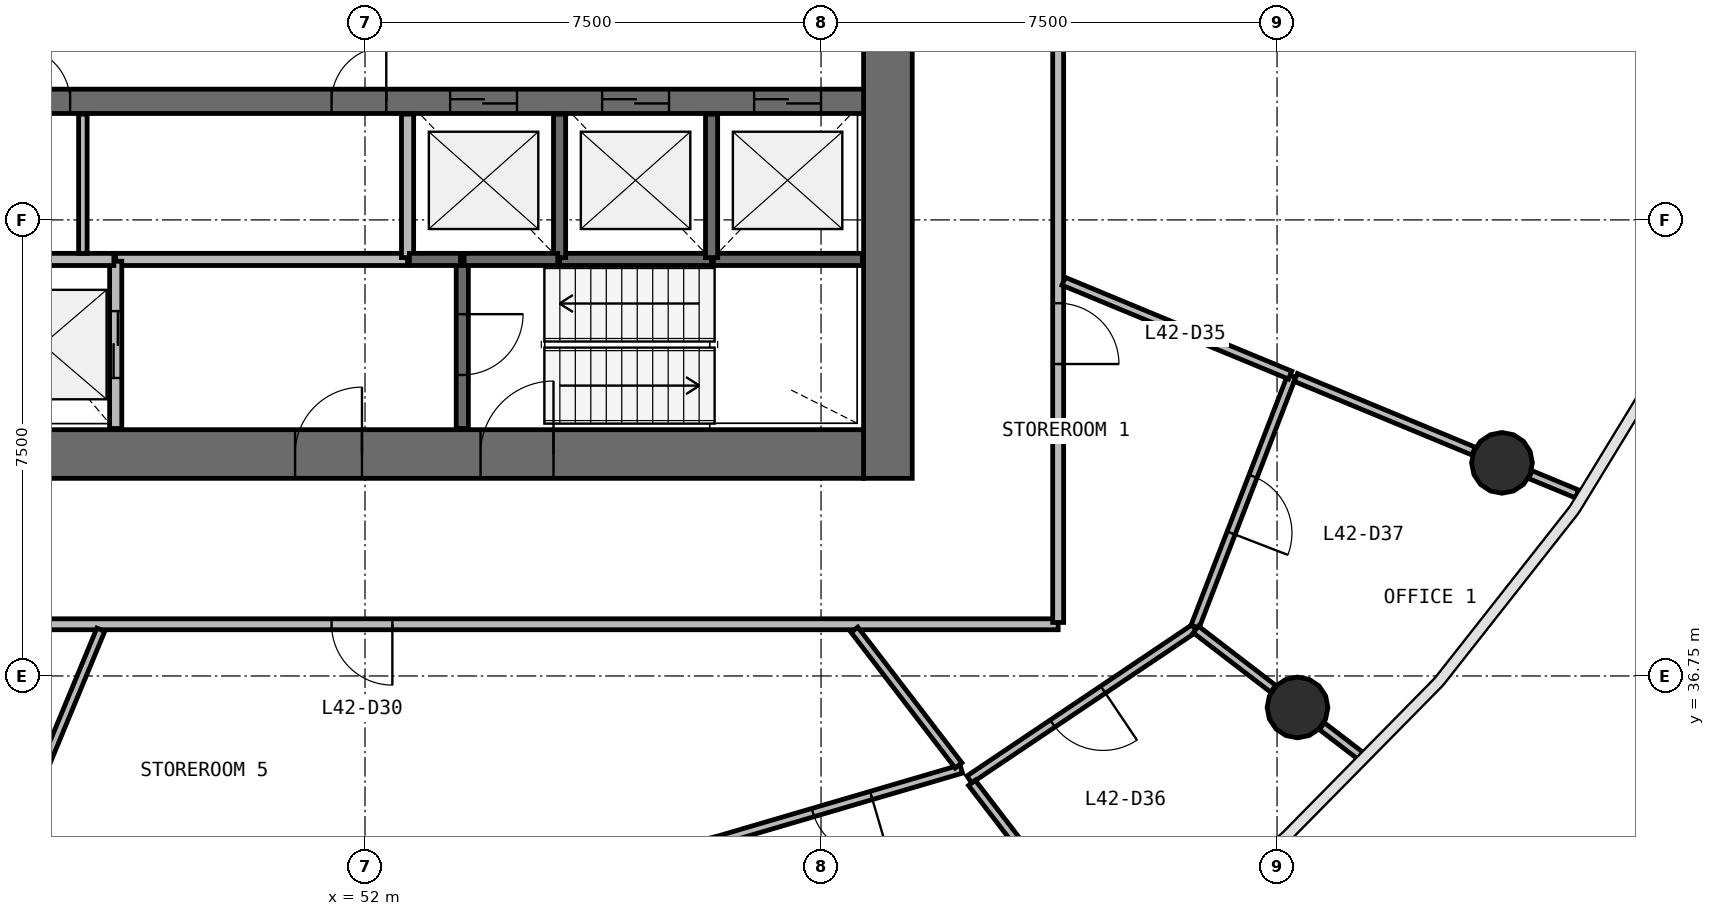
"""IFC4 building model, lengths in metres.
Left out: names, types, materials, properties, quantities, classifications, styles, units other than length and angle.
Written with IfcOpenShell. Run it as: python <this file> out.ifc"""

import sys

from ifc_helpers import new_model, si_unit, direction, frame, frame_2d, origin, origin_2d, place, context, subcontext, project, spatial, rectangle, circle, extrude, source, transform, mapped, element, fill, save


model = new_model("IFC4")
c1 = context("Model", 3, precision=1e-05, world=origin(), true_north=direction((0.0, 1.0)))
c2 = subcontext(c1, "Body", "Model", "MODEL_VIEW")
j1 = project(units=[si_unit("LENGTHUNIT", "METRE"), si_unit("PLANEANGLEUNIT", "RADIAN")], contexts=[c1])
p1 = place(None, origin())
s1 = spatial("IfcSite", under=j1, at=p1, CompositionType="ELEMENT")
p2 = place(p1, origin())
s2 = spatial("IfcBuilding", under=s1, at=p2, CompositionType="ELEMENT")
p3 = place(p2, frame((0.0, 0.0, 176.0)))
s3 = spatial("IfcBuildingStorey", under=s2, at=p3, CompositionType="ELEMENT", Elevation=176.0)
p4 = place(p3, frame((60.6, 40.0, 0.0), z_axis=(0.0, 0.0, 1.0), x_axis=(0.0, 1.0, 0.0)))
e1 = element("IfcWall", 1, at=p4, inside=s3, PredefinedType="SHEAR", context=c2, shape_type="SweptSolid", body=[
    extrude(rectangle(XDim=16.0, YDim=0.8, at=frame_2d((8.0, 0.0))), origin(), (0.0, 0.0, 1.0), 3.9),
])
p5 = place(p4, frame((7.1, 0.0, 0.0)))
e2 = element("IfcOpeningElement", 2, at=p5, cuts=e1, PredefinedType="OPENING", context=c2, shape_type="SweptSolid", body=[
    extrude(rectangle(XDim=1.8, YDim=2.1, at=frame_2d((0.9, 1.05))), frame((0.0, 0.41, 0.0), z_axis=(0.0, -1.0, 0.0), x_axis=(1.0, 0.0, 0.0)), (0.0, 0.0, 1.0), 0.82),
])
p6 = place(p3, frame((43.8, 40.4, 0.0), z_axis=(0.0, 0.0, 1.0), x_axis=(1.0, 0.0, 0.0)))
e3 = element("IfcWall", 3, at=p6, inside=s3, PredefinedType="SHEAR", context=c2, shape_type="SweptSolid", body=[
    extrude(rectangle(XDim=16.4, YDim=0.8, at=frame_2d((8.2, 0.0))), origin(), (0.0, 0.0, 1.0), 3.9),
])
p7 = place(p6, frame((10.1, 0.0, 0.0)))
e4 = element("IfcOpeningElement", 4, at=p7, cuts=e3, PredefinedType="OPENING", context=c2, shape_type="SweptSolid", body=[
    extrude(rectangle(XDim=1.2, YDim=2.1, at=frame_2d((0.6, 1.05))), frame((0.0, 0.41, 0.0), z_axis=(0.0, -1.0, 0.0), x_axis=(1.0, 0.0, 0.0)), (0.0, 0.0, 1.0), 0.82),
])
p8 = place(p6, frame((7.05, 0.0, 0.0)))
e5 = element("IfcOpeningElement", 5, at=p8, cuts=e3, PredefinedType="OPENING", context=c2, shape_type="SweptSolid", body=[
    extrude(rectangle(XDim=1.1, YDim=2.1, at=frame_2d((0.55, 1.05))), frame((0.0, 0.41, 0.0), z_axis=(0.0, -1.0, 0.0), x_axis=(1.0, 0.0, 0.0)), (0.0, 0.0, 1.0), 0.82),
])
p9 = place(p6, frame((0.5, 0.0, 0.0)))
e6 = element("IfcOpeningElement", 6, at=p9, cuts=e3, PredefinedType="OPENING", context=c2, shape_type="SweptSolid", body=[
    extrude(rectangle(XDim=0.8, YDim=2.1, at=frame_2d((0.4, 1.05))), frame((0.0, 0.41, 0.0), z_axis=(0.0, -1.0, 0.0), x_axis=(1.0, 0.0, 0.0)), (0.0, 0.0, 1.0), 0.82),
])
p10 = place(p3, frame((43.8, 46.2, 0.0), z_axis=(0.0, 0.0, 1.0), x_axis=(1.0, 0.0, 0.0)))
e7 = element("IfcWall", 7, at=p10, inside=s3, PredefinedType="SHEAR", context=c2, shape_type="SweptSolid", body=[
    extrude(rectangle(XDim=16.4, YDim=0.4, at=frame_2d((8.2, 0.0))), origin(), (0.0, 0.0, 1.0), 3.9),
])
p11 = place(p10, frame((9.6, 0.0, 0.0)))
e8 = element("IfcOpeningElement", 8, at=p11, cuts=e7, PredefinedType="OPENING", context=c2, shape_type="SweptSolid", body=[
    extrude(rectangle(XDim=1.1, YDim=2.1, at=frame_2d((0.55, 1.05))), frame((0.0, 0.21, 0.0), z_axis=(0.0, -1.0, 0.0), x_axis=(1.0, 0.0, 0.0)), (0.0, 0.0, 1.0), 0.42),
])
p12 = place(p10, frame((12.1, 0.0, 0.0)))
e9 = element("IfcOpeningElement", 9, at=p12, cuts=e7, PredefinedType="OPENING", context=c2, shape_type="SweptSolid", body=[
    extrude(rectangle(XDim=1.1, YDim=2.1, at=frame_2d((0.55, 1.05))), frame((0.0, 0.21, 0.0), z_axis=(0.0, -1.0, 0.0), x_axis=(1.0, 0.0, 0.0)), (0.0, 0.0, 1.0), 0.42),
])
p13 = place(p10, frame((14.6, 0.0, 0.0)))
e10 = element("IfcOpeningElement", 10, at=p13, cuts=e7, PredefinedType="OPENING", context=c2, shape_type="SweptSolid", body=[
    extrude(rectangle(XDim=1.1, YDim=2.1, at=frame_2d((0.55, 1.05))), frame((0.0, 0.21, 0.0), z_axis=(0.0, -1.0, 0.0), x_axis=(1.0, 0.0, 0.0)), (0.0, 0.0, 1.0), 0.42),
])
p14 = place(p10, frame((2.45, 0.0, 0.0)))
e11 = element("IfcOpeningElement", 11, at=p14, cuts=e7, PredefinedType="OPENING", context=c2, shape_type="SweptSolid", body=[
    extrude(rectangle(XDim=0.9, YDim=2.1, at=frame_2d((0.45, 1.05))), frame((0.0, 0.21, 0.0), z_axis=(0.0, -1.0, 0.0), x_axis=(1.0, 0.0, 0.0)), (0.0, 0.0, 1.0), 0.42),
])
p15 = place(p10, frame((7.65, 0.0, 0.0)))
e12 = element("IfcOpeningElement", 12, at=p15, cuts=e7, PredefinedType="OPENING", context=c2, shape_type="SweptSolid", body=[
    extrude(rectangle(XDim=0.9, YDim=2.1, at=frame_2d((0.45, 1.05))), frame((0.0, 0.21, 0.0), z_axis=(0.0, -1.0, 0.0), x_axis=(1.0, 0.0, 0.0)), (0.0, 0.0, 1.0), 0.42),
])
m1 = source(origin(), c2, "Body", "SweptSolid", [
    extrude(circle(Radius=0.5, at=origin_2d()), origin(), (0.0, 0.0, 1.0), 3.9),
])
for number, where, z_axis, x_axis in (
    (13, (67.336, 36.232, 0.0), (0.0, 0.0, 1.0), (1.0, 0.0, 0.0)),
    (14, (70.699, 40.254, 0.0), (0.0, 0.0, 1.0), (1.0, 0.0, 0.0)),
):
    element("IfcColumn", number, at=place(p3, frame(where, z_axis=z_axis, x_axis=x_axis)), inside=s3, PredefinedType="COLUMN", context=c2, shape_type="MappedRepresentation", body=[
        mapped(m1, transform((0.0, 0.0, 0.0), scale=1.0)),
    ])
p16 = place(p3, frame((52.7, 43.6, 0.0), z_axis=(0.0, 0.0, 1.0), x_axis=(-1.0, 0.0, 0.0)))
e15 = element("IfcWall", 15, at=p16, inside=s3, PredefinedType="SOLIDWALL", context=c2, shape_type="SweptSolid", body=[
    extrude(rectangle(XDim=4.8, YDim=0.2, at=frame_2d((2.4, 0.0))), origin(), (0.0, 0.0, 1.0), 3.4),
])
p17 = place(p3, frame((47.9, 40.82, 0.0), z_axis=(0.0, 0.0, 1.0), x_axis=(0.0, 1.0, 0.0)))
e16 = element("IfcWall", 16, at=p17, inside=s3, PredefinedType="SOLIDWALL", context=c2, shape_type="SweptSolid", body=[
    extrude(rectangle(XDim=2.75, YDim=0.2, at=frame_2d((1.375, 0.0))), origin(), (0.0, 0.0, 1.0), 3.4),
])
p18 = place(p17, frame((0.83, 0.0, 0.0)))
e17 = element("IfcOpeningElement", 17, at=p18, cuts=e16, PredefinedType="OPENING", context=c2, shape_type="SweptSolid", body=[
    extrude(rectangle(XDim=1.1, YDim=2.1, at=frame_2d((0.55, 1.05))), frame((0.0, 0.11, 0.0), z_axis=(0.0, -1.0, 0.0), x_axis=(1.0, 0.0, 0.0)), (0.0, 0.0, 1.0), 0.22),
])
p19 = place(p3, frame((53.6, 43.6, 0.0), z_axis=(0.0, 0.0, 1.0), x_axis=(0.0, -1.0, 0.0)))
e18 = element("IfcWall", 18, at=p19, inside=s3, PredefinedType="SOLIDWALL", context=c2, shape_type="SweptSolid", body=[
    extrude(rectangle(XDim=2.78, YDim=0.2, at=frame_2d((1.39, 0.0))), origin(), (0.0, 0.0, 1.0), 3.4),
])
p20 = place(p19, frame((0.9, 0.0, 0.0)))
e19 = element("IfcOpeningElement", 19, at=p20, cuts=e18, PredefinedType="OPENING", context=c2, shape_type="SweptSolid", body=[
    extrude(rectangle(XDim=1.0, YDim=2.1, at=frame_2d((0.5, 1.05))), frame((0.0, 0.11, 0.0), z_axis=(0.0, -1.0, 0.0), x_axis=(1.0, 0.0, 0.0)), (0.0, 0.0, 1.0), 0.22),
])
p21 = place(p3, frame((55.2, 43.6, 0.0), z_axis=(0.0, 0.0, 1.0), x_axis=(1.0, 0.0, 0.0)))
e20 = element("IfcWall", 20, at=p21, inside=s3, PredefinedType="SOLIDWALL", context=c2, shape_type="SweptSolid", body=[
    extrude(rectangle(XDim=2.5, YDim=0.2, at=frame_2d((1.25, 0.0))), origin(), (0.0, 0.0, 1.0), 3.4),
])
p22 = place(p3, frame((57.73, 43.6, 0.0), z_axis=(0.0, 0.0, 1.0), x_axis=(1.0, 0.0, 0.0)))
e21 = element("IfcWall", 21, at=p22, inside=s3, PredefinedType="SOLIDWALL", context=c2, shape_type="SweptSolid", body=[
    extrude(rectangle(XDim=2.45, YDim=0.2, at=frame_2d((1.225, 0.0))), origin(), (0.0, 0.0, 1.0), 3.4),
])
p23 = place(p3, frame((47.87, 43.6, 0.0), z_axis=(0.0, 0.0, 1.0), x_axis=(-1.0, 0.0, 0.0)))
e22 = element("IfcWall", 22, at=p23, inside=s3, PredefinedType="SOLIDWALL", context=c2, shape_type="SweptSolid", body=[
    extrude(rectangle(XDim=2.34, YDim=0.2, at=frame_2d((1.17, 0.0))), origin(), (0.0, 0.0, 1.0), 3.4),
])
for number, where, z_axis, x_axis in (
    (23, (52.7, 45.99, 0.0), (0.0, 0.0, 1.0), (0.0, -1.0, 0.0)),
    (24, (55.2, 43.63, 0.0), (0.0, 0.0, 1.0), (0.0, 1.0, 0.0)),
    (25, (57.7, 43.63, 0.0), (0.0, 0.0, 1.0), (0.0, 1.0, 0.0)),
):
    element("IfcWall", number, at=place(p3, frame(where, z_axis=z_axis, x_axis=x_axis)), inside=s3, PredefinedType="SOLIDWALL", context=c2, shape_type="SweptSolid", body=[
        extrude(rectangle(XDim=2.36, YDim=0.2, at=frame_2d((1.18, 0.0))), origin(), (0.0, 0.0, 1.0), 3.4),
    ])
p24 = place(p3, frame((53.63, 43.6, 0.0), z_axis=(0.0, 0.0, 1.0), x_axis=(1.0, 0.0, 0.0)))
e26 = element("IfcWall", 26, at=p24, inside=s3, PredefinedType="SOLIDWALL", context=c2, shape_type="SweptSolid", body=[
    extrude(rectangle(XDim=1.54, YDim=0.2, at=frame_2d((0.77, 0.0))), origin(), (0.0, 0.0, 1.0), 3.4),
])
p25 = place(p3, frame((52.73, 43.6, 0.0), z_axis=(0.0, 0.0, 1.0), x_axis=(1.0, 0.0, 0.0)))
e27 = element("IfcWall", 27, at=p25, inside=s3, PredefinedType="SOLIDWALL", context=c2, shape_type="SweptSolid", body=[
    extrude(rectangle(XDim=0.84, YDim=0.2, at=frame_2d((0.42, 0.0))), origin(), (0.0, 0.0, 1.0), 3.4),
])
p26 = place(p3, frame((63.4, 37.6, 0.0), z_axis=(0.0, 0.0, 1.0), x_axis=(-1.0, 0.0, 0.0)))
e28 = element("IfcWall", 28, at=p26, inside=s3, PredefinedType="PARTITIONING", context=c2, shape_type="SweptSolid", body=[
    extrude(rectangle(XDim=22.8, YDim=0.18, at=frame_2d((11.4, 0.0))), origin(), (0.0, 0.0, 1.0), 2.7),
])
p27 = place(p26, frame((10.95, 0.0, 0.0)))
e29 = element("IfcOpeningElement", 29, at=p27, cuts=e28, PredefinedType="OPENING", context=c2, shape_type="SweptSolid", body=[
    extrude(rectangle(XDim=1.0, YDim=2.1, at=frame_2d((0.5, 1.05))), frame((0.0, 0.1, 0.0), z_axis=(0.0, -1.0, 0.0), x_axis=(1.0, 0.0, 0.0)), (0.0, 0.0, 1.0), 0.2),
])
p28 = place(p3, frame((63.4, 58.37, 0.0), z_axis=(0.0, 0.0, 1.0), x_axis=(0.0, -1.0, 0.0)))
e30 = element("IfcWall", 30, at=p28, inside=s3, PredefinedType="PARTITIONING", context=c2, shape_type="SweptSolid", body=[
    extrude(rectangle(XDim=20.74, YDim=0.18, at=frame_2d((10.37, 0.0))), origin(), (0.0, 0.0, 1.0), 2.7),
])
p29 = place(p28, frame((15.49, 0.0, 0.0)))
e31 = element("IfcOpeningElement", 31, at=p29, cuts=e30, PredefinedType="OPENING", context=c2, shape_type="SweptSolid", body=[
    extrude(rectangle(XDim=1.0, YDim=2.1, at=frame_2d((0.5, 1.05))), frame((0.0, 0.1, 0.0), z_axis=(0.0, -1.0, 0.0), x_axis=(1.0, 0.0, 0.0)), (0.0, 0.0, 1.0), 0.2),
])
p30 = place(p28, frame((9.89, 0.0, 0.0)))
e32 = element("IfcOpeningElement", 32, at=p30, cuts=e30, PredefinedType="OPENING", context=c2, shape_type="SweptSolid", body=[
    extrude(rectangle(XDim=1.0, YDim=2.1, at=frame_2d((0.5, 1.05))), frame((0.0, 0.1, 0.0), z_axis=(0.0, -1.0, 0.0), x_axis=(1.0, 0.0, 0.0)), (0.0, 0.0, 1.0), 0.2),
])
p31 = place(p3, frame((47.655, 37.51, 0.0), z_axis=(0.0, 0.0, 1.0), x_axis=(-0.382665709235, -0.923886873473, 0.0)))
e33 = element("IfcWall", 33, at=p31, inside=s3, PredefinedType="PARTITIONING", context=c2, shape_type="SweptSolid", body=[
    extrude(rectangle(XDim=5.266, YDim=0.14, at=frame_2d((2.633, 0.0))), origin(), (0.0, 0.0, 1.0), 2.7),
])
p32 = place(p3, frame((65.64, 37.534, 0.0), z_axis=(0.0, 0.0, 1.0), x_axis=(-0.83011613123, -0.557590538543, 0.0)))
e34 = element("IfcWall", 34, at=p32, inside=s3, PredefinedType="PARTITIONING", context=c2, shape_type="SweptSolid", body=[
    extrude(rectangle(XDim=4.459, YDim=0.14, at=frame_2d((2.229, 0.0))), origin(), (0.0, 0.0, 1.0), 2.7),
])
p33 = place(p32, frame((1.809, 0.0, 0.0)))
e35 = element("IfcOpeningElement", 35, at=p33, cuts=e34, PredefinedType="OPENING", context=c2, shape_type="SweptSolid", body=[
    extrude(rectangle(XDim=1.0, YDim=2.1, at=frame_2d((0.5, 1.05))), frame((0.0, 0.08, 0.0), z_axis=(0.0, -1.0, 0.0), x_axis=(1.0, 0.0, 0.0)), (0.0, 0.0, 1.0), 0.16),
])
p34 = place(p3, frame((67.243, 41.686, 0.0), z_axis=(0.0, 0.0, 1.0), x_axis=(-0.36010004646, -0.932913691903, 0.0)))
e36 = element("IfcWall", 36, at=p34, inside=s3, PredefinedType="PARTITIONING", context=c2, shape_type="SweptSolid", body=[
    extrude(rectangle(XDim=4.421, YDim=0.14, at=frame_2d((2.21, 0.0))), origin(), (0.0, 0.0, 1.0), 2.7),
])
p35 = place(p34, frame((1.771, 0.0, 0.0)))
e37 = element("IfcOpeningElement", 37, at=p35, cuts=e36, PredefinedType="OPENING", context=c2, shape_type="SweptSolid", body=[
    extrude(rectangle(XDim=1.0, YDim=2.1, at=frame_2d((0.5, 1.05))), frame((0.0, 0.08, 0.0), z_axis=(0.0, -1.0, 0.0), x_axis=(1.0, 0.0, 0.0)), (0.0, 0.0, 1.0), 0.16),
])
p36 = place(p3, frame((61.807, 35.219, 0.0), z_axis=(0.0, 0.0, 1.0), x_axis=(-0.959548852108, -0.281542182308, 0.0)))
e38 = element("IfcWall", 38, at=p36, inside=s3, PredefinedType="PARTITIONING", context=c2, shape_type="SweptSolid", body=[
    extrude(rectangle(XDim=4.194, YDim=0.14, at=frame_2d((2.097, 0.0))), origin(), (0.0, 0.0, 1.0), 2.7),
])
p37 = place(p36, frame((1.544, 0.0, 0.0)))
e39 = element("IfcOpeningElement", 39, at=p37, cuts=e38, PredefinedType="OPENING", context=c2, shape_type="SweptSolid", body=[
    extrude(rectangle(XDim=1.0, YDim=2.1, at=frame_2d((0.5, 1.05))), frame((0.0, 0.08, 0.0), z_axis=(0.0, -1.0, 0.0), x_axis=(1.0, 0.0, 0.0)), (0.0, 0.0, 1.0), 0.16),
])
p38 = place(p3, frame((63.49, 43.241, 0.0), z_axis=(0.0, 0.0, 1.0), x_axis=(0.923881042502, -0.382679786906, 0.0)))
e40 = element("IfcWall", 40, at=p38, inside=s3, PredefinedType="PARTITIONING", context=c2, shape_type="SweptSolid", body=[
    extrude(rectangle(XDim=4.032, YDim=0.14, at=frame_2d((2.016, 0.0))), origin(), (0.0, 0.0, 1.0), 2.7),
])
p39 = place(p3, frame((67.307, 41.659, 0.0), z_axis=(0.0, 0.0, 1.0), x_axis=(0.923882446808, -0.382676396554, 0.0)))
e41 = element("IfcWall", 41, at=p39, inside=s3, PredefinedType="PARTITIONING", context=c2, shape_type="SweptSolid", body=[
    extrude(rectangle(XDim=3.166, YDim=0.14, at=frame_2d((1.583, 0.0))), origin(), (0.0, 0.0, 1.0), 2.7),
])
p40 = place(p3, frame((60.049, 37.51, 0.0), z_axis=(0.0, 0.0, 1.0), x_axis=(0.608728570765, -0.793378552228, 0.0)))
e42 = element("IfcWall", 42, at=p40, inside=s3, PredefinedType="PARTITIONING", context=c2, shape_type="SweptSolid", body=[
    extrude(rectangle(XDim=2.812, YDim=0.14, at=frame_2d((1.406, 0.0))), origin(), (0.0, 0.0, 1.0), 2.7),
])
p41 = place(p3, frame((47.36, 43.7, 0.0), z_axis=(0.0, 0.0, 1.0), x_axis=(0.0, 1.0, 0.0)))
e43 = element("IfcWall", 43, at=p41, inside=s3, PredefinedType="PARTITIONING", context=c2, shape_type="SweptSolid", body=[
    extrude(rectangle(XDim=2.29, YDim=0.14, at=frame_2d((1.145, 0.0))), origin(), (0.0, 0.0, 1.0), 2.7),
])
p42 = place(p3, frame((61.981, 34.992, 0.0), z_axis=(0.0, 0.0, 1.0), x_axis=(0.608771999469, -0.79334522918, 0.0)))
e44 = element("IfcWall", 44, at=p42, inside=s3, PredefinedType="PARTITIONING", context=c2, shape_type="SweptSolid", body=[
    extrude(rectangle(XDim=2.062, YDim=0.14, at=frame_2d((1.031, 0.0))), origin(), (0.0, 0.0, 1.0), 2.7),
])
p43 = place(p3, frame((65.664, 37.515, 0.0), z_axis=(0.0, 0.0, 1.0), x_axis=(0.793319585816, -0.608805416173, 0.0)))
e45 = element("IfcWall", 45, at=p43, inside=s3, PredefinedType="PARTITIONING", context=c2, shape_type="SweptSolid", body=[
    extrude(rectangle(XDim=1.604, YDim=0.14, at=frame_2d((0.802, 0.0))), origin(), (0.0, 0.0, 1.0), 2.7),
])
p44 = place(p3, frame((71.166, 40.061, 0.0), z_axis=(0.0, 0.0, 1.0), x_axis=(0.923909393783, -0.382611332921, 0.0)))
e46 = element("IfcWall", 46, at=p44, inside=s3, PredefinedType="PARTITIONING", context=c2, shape_type="SweptSolid", body=[
    extrude(rectangle(XDim=0.831, YDim=0.14, at=frame_2d((0.416, 0.0))), origin(), (0.0, 0.0, 1.0), 2.7),
])
p45 = place(p3, frame((67.737, 35.925, 0.0), z_axis=(0.0, 0.0, 1.0), x_axis=(0.793425360376, -0.608667559109, 0.0)))
e47 = element("IfcWall", 47, at=p45, inside=s3, PredefinedType="PARTITIONING", context=c2, shape_type="SweptSolid", body=[
    extrude(rectangle(XDim=0.803, YDim=0.14, at=frame_2d((0.402, 0.0))), origin(), (0.0, 0.0, 1.0), 2.7),
])
m2 = source(origin(), c2, "Body", "SweptSolid", [
    extrude(rectangle(XDim=1.1, YDim=2.1, at=frame_2d((0.55, 1.05))), frame((0.0, 0.025, 0.0), z_axis=(0.0, -1.0, 0.0), x_axis=(1.0, 0.0, 0.0)), (0.0, 0.0, 1.0), 0.05),
])
p46 = place(p11, origin())
e48 = element("IfcDoor", 48, at=p46, inside=s3, OperationType="DOUBLE_DOOR_SLIDING", PredefinedType="USERDEFINED", context=c2, shape_type="MappedRepresentation", body=[
    mapped(m2, transform((0.0, 0.0, 0.0), scale=1.0)),
])
fill(e8, e48)
p47 = place(p12, origin())
e49 = element("IfcDoor", 49, at=p47, inside=s3, OperationType="DOUBLE_DOOR_SLIDING", PredefinedType="USERDEFINED", context=c2, shape_type="MappedRepresentation", body=[
    mapped(m2, transform((0.0, 0.0, 0.0), scale=1.0)),
])
fill(e9, e49)
p48 = place(p13, origin())
e50 = element("IfcDoor", 50, at=p48, inside=s3, OperationType="DOUBLE_DOOR_SLIDING", PredefinedType="USERDEFINED", context=c2, shape_type="MappedRepresentation", body=[
    mapped(m2, transform((0.0, 0.0, 0.0), scale=1.0)),
])
fill(e10, e50)
p49 = place(p18, origin())
e51 = element("IfcDoor", 51, at=p49, inside=s3, OperationType="DOUBLE_DOOR_SLIDING", PredefinedType="USERDEFINED", context=c2, shape_type="MappedRepresentation", body=[
    mapped(m2, transform((0.0, 0.0, 0.0), scale=1.0)),
])
fill(e17, e51)
m3 = source(origin(), c2, "Body", "SweptSolid", [
    extrude(rectangle(XDim=1.2, YDim=2.1, at=frame_2d((0.6, 1.05))), frame((0.0, 0.025, 0.0), z_axis=(0.0, -1.0, 0.0), x_axis=(1.0, 0.0, 0.0)), (0.0, 0.0, 1.0), 0.05),
])
p50 = place(p7, origin())
e52 = element("IfcDoor", 52, at=p50, inside=s3, OperationType="SINGLE_SWING_RIGHT", PredefinedType="DOOR", context=c2, shape_type="MappedRepresentation", body=[
    mapped(m3, transform((0.0, 0.0, 0.0), scale=1.0)),
])
fill(e4, e52)
m4 = source(origin(), c2, "Body", "SweptSolid", [
    extrude(rectangle(XDim=1.0, YDim=2.1, at=frame_2d((0.5, 1.05))), frame((0.0, 0.025, 0.0), z_axis=(0.0, -1.0, 0.0), x_axis=(1.0, 0.0, 0.0)), (0.0, 0.0, 1.0), 0.05),
])
p51 = place(p20, origin())
e53 = element("IfcDoor", 53, at=p51, inside=s3, OperationType="SINGLE_SWING_LEFT", PredefinedType="DOOR", context=c2, shape_type="MappedRepresentation", body=[
    mapped(m4, transform((0.0, 0.0, 0.0), scale=1.0)),
])
fill(e19, e53)
m5 = source(origin(), c2, "Body", "SweptSolid", [
    extrude(rectangle(XDim=1.1, YDim=2.1, at=frame_2d((0.55, 1.05))), frame((0.0, 0.025, 0.0), z_axis=(0.0, -1.0, 0.0), x_axis=(1.0, 0.0, 0.0)), (0.0, 0.0, 1.0), 0.05),
])
p52 = place(p8, origin())
e54 = element("IfcDoor", 54, at=p52, inside=s3, OperationType="SINGLE_SWING_RIGHT", PredefinedType="DOOR", context=c2, shape_type="MappedRepresentation", body=[
    mapped(m5, transform((0.0, 0.0, 0.0), scale=1.0)),
])
fill(e5, e54)
m6 = source(origin(), c2, "Body", "SweptSolid", [
    extrude(rectangle(XDim=1.0, YDim=2.1, at=frame_2d((0.5, 1.05))), frame((0.0, 0.025, 0.0), z_axis=(0.0, -1.0, 0.0), x_axis=(1.0, 0.0, 0.0)), (0.0, 0.0, 1.0), 0.05),
])
p53 = place(p27, origin())
e55 = element("IfcDoor", 55, at=p53, inside=s3, OperationType="SINGLE_SWING_LEFT", PredefinedType="DOOR", context=c2, shape_type="MappedRepresentation", body=[
    mapped(m6, transform((0.0, 0.0, 0.0), scale=1.0)),
])
fill(e29, e55)
p54 = place(p37, origin())
e56 = element("IfcDoor", 56, at=p54, inside=s3, OperationType="SINGLE_SWING_LEFT", PredefinedType="DOOR", context=c2, shape_type="MappedRepresentation", body=[
    mapped(m6, transform((0.0, 0.0, 0.0), scale=1.0)),
])
fill(e39, e56)
p55 = place(p29, origin())
e57 = element("IfcDoor", 57, at=p55, inside=s3, OperationType="SINGLE_SWING_RIGHT", PredefinedType="DOOR", context=c2, shape_type="MappedRepresentation", body=[
    mapped(m6, transform((0.0, 0.0, 0.0), scale=1.0)),
])
fill(e31, e57)
p56 = place(p33, origin())
e58 = element("IfcDoor", 58, at=p56, inside=s3, OperationType="SINGLE_SWING_LEFT", PredefinedType="DOOR", context=c2, shape_type="MappedRepresentation", body=[
    mapped(m6, transform((0.0, 0.0, 0.0), scale=1.0)),
])
fill(e35, e58)
p57 = place(p35, origin())
e59 = element("IfcDoor", 59, at=p57, inside=s3, OperationType="SINGLE_SWING_RIGHT", PredefinedType="DOOR", context=c2, shape_type="MappedRepresentation", body=[
    mapped(m6, transform((0.0, 0.0, 0.0), scale=1.0)),
])
fill(e37, e59)
m7 = source(origin(), c2, "Body", "SweptSolid", [
    extrude(rectangle(XDim=0.9, YDim=2.1, at=frame_2d((0.45, 1.05))), frame((0.0, 0.025, 0.0), z_axis=(0.0, -1.0, 0.0), x_axis=(1.0, 0.0, 0.0)), (0.0, 0.0, 1.0), 0.05),
])
p58 = place(p14, origin())
e60 = element("IfcDoor", 60, at=p58, inside=s3, OperationType="SINGLE_SWING_LEFT", PredefinedType="DOOR", context=c2, shape_type="MappedRepresentation", body=[
    mapped(m7, transform((0.0, 0.0, 0.0), scale=1.0)),
])
fill(e11, e60)
p59 = place(p15, origin())
e61 = element("IfcDoor", 61, at=p59, inside=s3, OperationType="SINGLE_SWING_RIGHT", PredefinedType="DOOR", context=c2, shape_type="MappedRepresentation", body=[
    mapped(m7, transform((0.0, 0.0, 0.0), scale=1.0)),
])
fill(e12, e61)
save(model, sys.argv[1])
